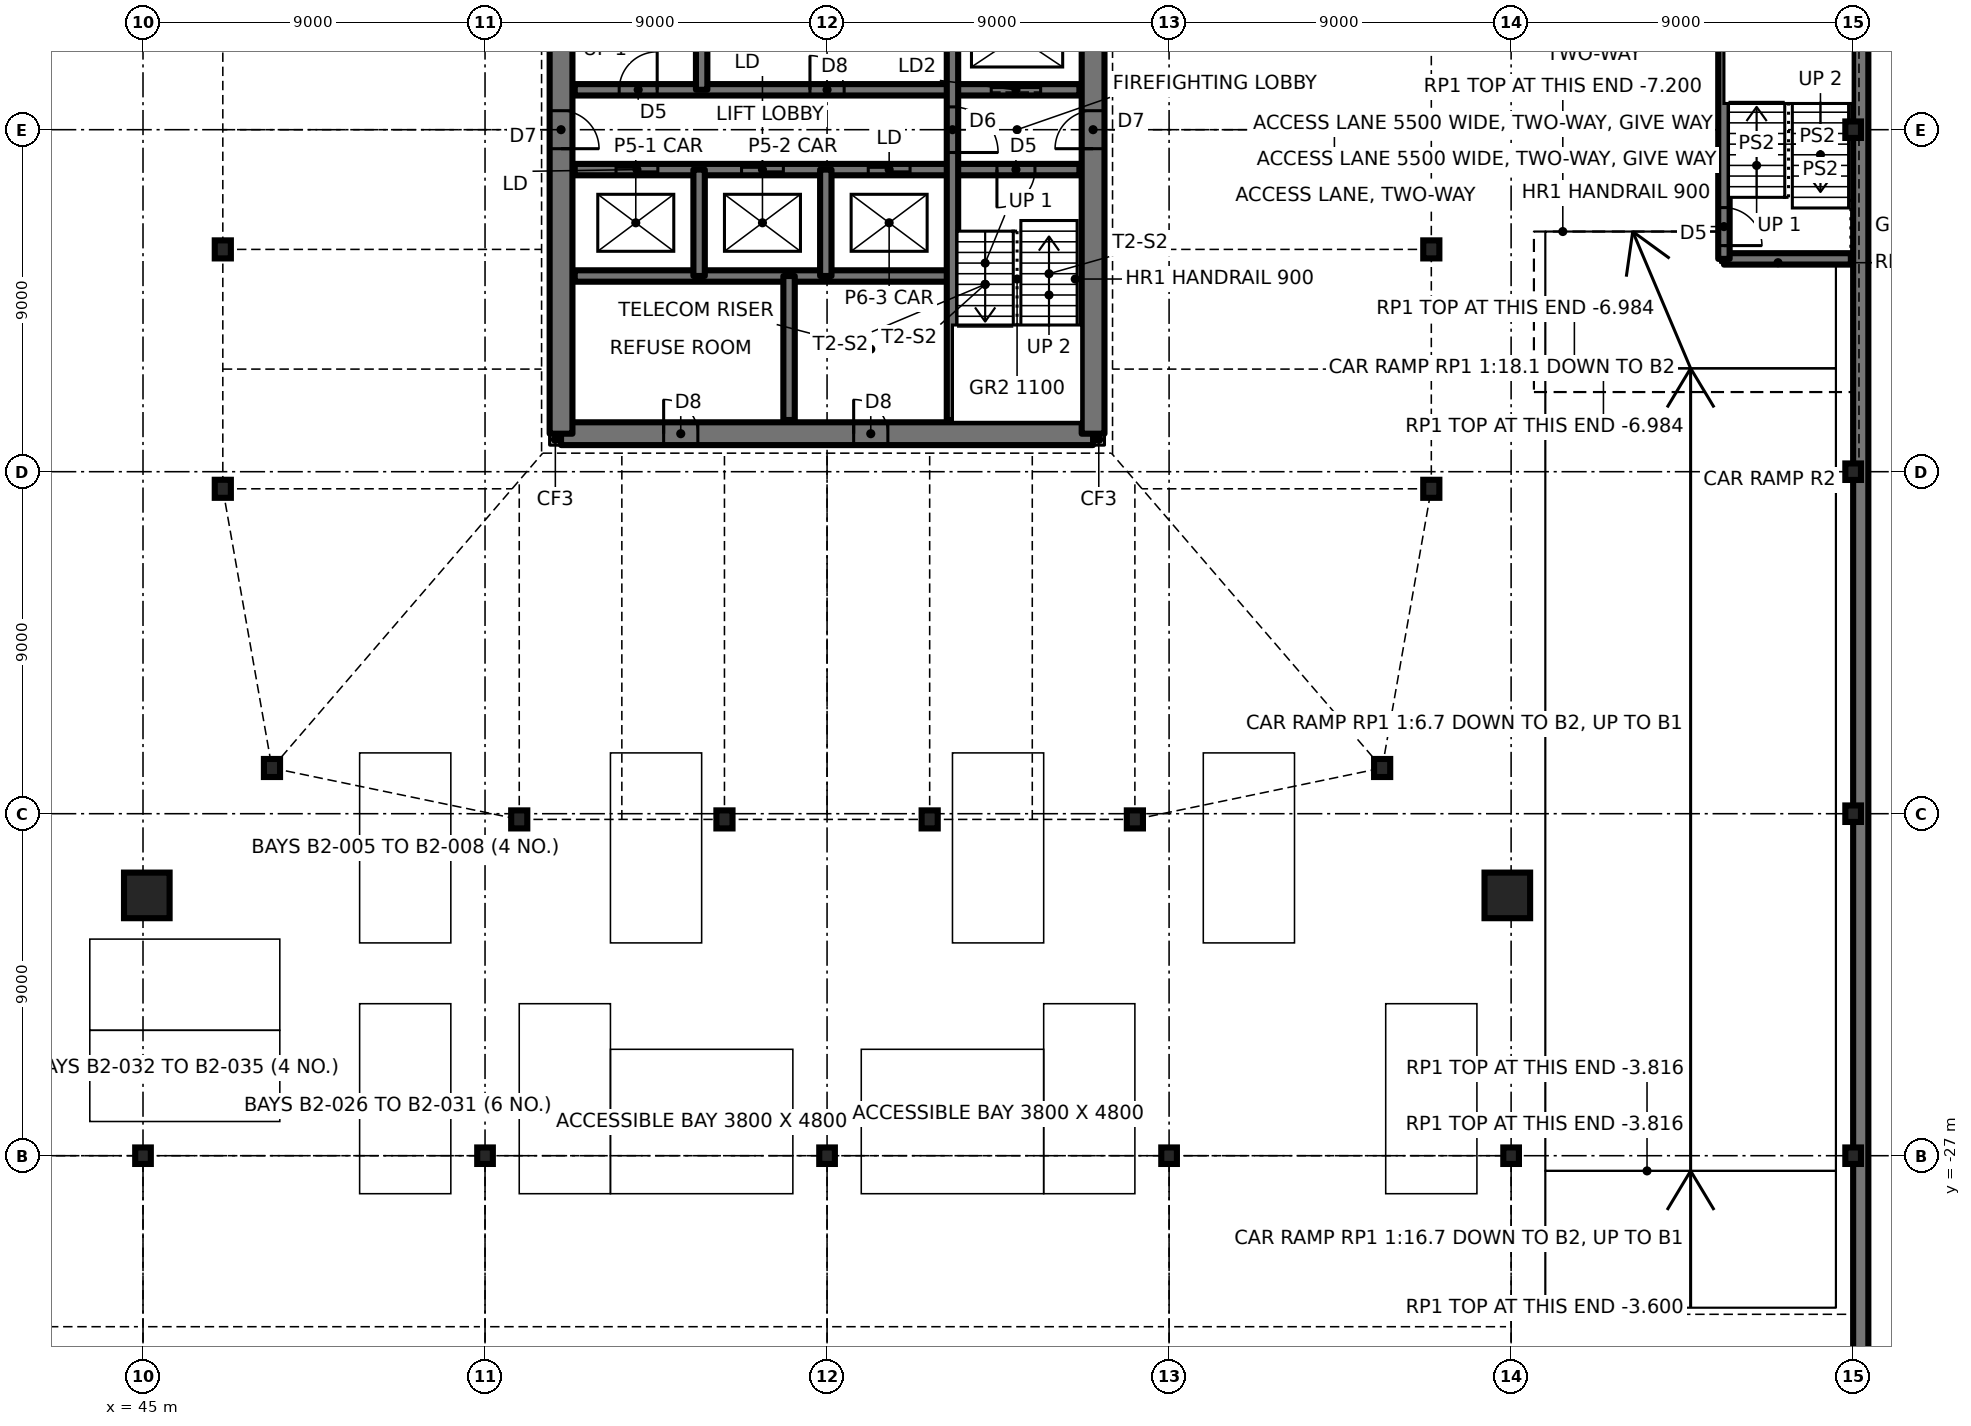
"""IFC4 building model, lengths in metres.
Left out: names, types, materials, properties, quantities, classifications, styles, units other than length and angle.
Written with IfcOpenShell. Run it as: python <this file> out.ifc"""

import sys

from ifc_helpers import new_model, si_unit, direction, frame, frame_2d, origin, origin_2d, place, context, subcontext, project, spatial, rectangle, hollow_rectangle, i_section, extrude, element, fill, save


model = new_model("IFC4")
c1 = context("Model", 3, precision=1e-05, world=origin(), true_north=direction((0.0, 1.0)))
c2 = subcontext(c1, "Body", "Model", "MODEL_VIEW")
j1 = project(units=[si_unit("LENGTHUNIT", "METRE"), si_unit("PLANEANGLEUNIT", "RADIAN")], contexts=[c1])
p1 = place(None, origin())
s1 = spatial("IfcSite", under=j1, at=p1, CompositionType="ELEMENT")
p2 = place(p1, origin())
s2 = spatial("IfcBuilding", under=s1, at=p2, CompositionType="ELEMENT")
p3 = place(p2, frame((0.0, 0.0, -7.2)))
s3 = spatial("IfcBuildingStorey", under=s2, at=p3, CompositionType="ELEMENT", Elevation=-7.2)
for number, where, z_axis, x_axis in (
    (1, (48.394, -16.797, -0.25), (0.0, 0.0, 1.0), (1.0, 0.0, 0.0)),
    (2, (54.9, -18.15, -0.25), (0.0, 0.0, 1.0), (1.0, 0.0, 0.0)),
    (3, (60.3, -18.15, -0.25), (0.0, 0.0, 1.0), (1.0, 0.0, 0.0)),
    (4, (65.7, -18.15, -0.25), (0.0, 0.0, 1.0), (1.0, 0.0, 0.0)),
    (5, (71.1, -18.15, -0.25), (0.0, 0.0, 1.0), (1.0, 0.0, 0.0)),
    (6, (77.606, -16.797, -0.25), (0.0, 0.0, 1.0), (1.0, 0.0, 0.0)),
    (7, (78.9, -9.45, -0.25), (0.0, 0.0, 1.0), (1.0, 0.0, 0.0)),
    (8, (78.9, -3.15, -0.25), (0.0, 0.0, 1.0), (1.0, 0.0, 0.0)),
    (9, (47.1, -3.15, -0.25), (0.0, 0.0, 1.0), (1.0, 0.0, 0.0)),
    (10, (47.1, -9.45, -0.25), (0.0, 0.0, 1.0), (1.0, 0.0, 0.0)),
):
    element("IfcColumn", number, at=place(p3, frame(where, z_axis=z_axis, x_axis=x_axis)), inside=s3, PredefinedType="COLUMN", context=c2, shape_type="SweptSolid", body=[
        extrude(i_section(OverallWidth=0.424, OverallDepth=0.475, WebThickness=0.048, FlangeThickness=0.077, at=origin_2d()), origin(), (0.0, 0.0, 1.0), 3.85),
    ])
for number, where, z_axis, x_axis in (
    (11, (45.1, -20.15, -0.25), (0.0, 0.0, 1.0), (1.0, 0.0, 0.0)),
    (12, (80.9, -20.15, -0.25), (0.0, 0.0, 1.0), (1.0, 0.0, 0.0)),
):
    element("IfcColumn", number, at=place(p3, frame(where, z_axis=z_axis, x_axis=x_axis)), inside=s3, PredefinedType="COLUMN", context=c2, shape_type="SweptSolid", body=[
        extrude(hollow_rectangle(XDim=1.2, YDim=1.2, WallThickness=0.07, at=origin_2d()), origin(), (0.0, 0.0, 1.0), 3.85),
    ])
for number, where, z_axis, x_axis in (
    (13, (45.0, -27.0, -0.25), (0.0, 0.0, 1.0), (1.0, 0.0, 0.0)),
    (14, (54.0, -27.0, -0.25), (0.0, 0.0, 1.0), (1.0, 0.0, 0.0)),
    (15, (63.0, -27.0, -0.25), (0.0, 0.0, 1.0), (1.0, 0.0, 0.0)),
    (16, (72.0, -27.0, -0.25), (0.0, 0.0, 1.0), (1.0, 0.0, 0.0)),
    (17, (81.0, -27.0, -0.25), (0.0, 0.0, 1.0), (1.0, 0.0, 0.0)),
    (18, (90.0, -27.0, -0.25), (0.0, 0.0, 1.0), (1.0, 0.0, 0.0)),
    (19, (90.0, -18.0, -0.25), (0.0, 0.0, 1.0), (1.0, 0.0, 0.0)),
    (20, (90.0, -9.0, -0.25), (0.0, 0.0, 1.0), (1.0, 0.0, 0.0)),
    (21, (90.0, 0.0, -0.25), (0.0, 0.0, 1.0), (1.0, 0.0, 0.0)),
):
    element("IfcColumn", number, at=place(p3, frame(where, z_axis=z_axis, x_axis=x_axis)), inside=s3, PredefinedType="COLUMN", context=c2, shape_type="SweptSolid", body=[
        extrude(i_section(OverallWidth=0.411, OverallDepth=0.434, WebThickness=0.036, FlangeThickness=0.057, at=origin_2d()), origin(), (0.0, 0.0, 1.0), 3.85),
    ])
for number, where, z_axis, x_axis in (
    (22, (55.7, -8.15, -0.25), (0.0, 0.0, 1.0), (1.0, 0.0, 0.0)),
    (23, (70.0, -8.15, -0.25), (0.0, 0.0, 1.0), (1.0, 0.0, 0.0)),
):
    element("IfcWall", number, at=place(p3, frame(where, z_axis=z_axis, x_axis=x_axis)), inside=s3, PredefinedType="SOLIDWALL", context=c2, shape_type="SweptSolid", body=[
        extrude(rectangle(XDim=0.3, YDim=0.3, at=frame_2d((0.15, 0.0))), origin(), (0.0, 0.0, 1.0), 3.85),
    ])
p4 = place(p3, frame((56.0, -8.0, -0.25), z_axis=(0.0, 0.0, 1.0), x_axis=(1.0, 0.0, 0.0)))
e24 = element("IfcWall", 24, at=p4, inside=s3, PredefinedType="SHEAR", context=c2, shape_type="SweptSolid", body=[
    extrude(rectangle(XDim=14.0, YDim=0.6, at=frame_2d((7.0, 0.0))), origin(), (0.0, 0.0, 1.0), 3.85),
])
p5 = place(p4, frame((2.7, 0.0, 0.25)))
e25 = element("IfcOpeningElement", 25, at=p5, cuts=e24, PredefinedType="OPENING", context=c2, shape_type="SweptSolid", body=[
    extrude(rectangle(XDim=0.9, YDim=2.1, at=frame_2d((0.45, 1.05))), frame((0.0, 0.31, 0.0), z_axis=(0.0, -1.0, 0.0), x_axis=(1.0, 0.0, 0.0)), (0.0, 0.0, 1.0), 0.62),
])
p6 = place(p4, frame((7.7, 0.0, 0.25)))
e26 = element("IfcOpeningElement", 26, at=p6, cuts=e24, PredefinedType="OPENING", context=c2, shape_type="SweptSolid", body=[
    extrude(rectangle(XDim=0.9, YDim=2.1, at=frame_2d((0.45, 1.05))), frame((0.0, 0.31, 0.0), z_axis=(0.0, -1.0, 0.0), x_axis=(1.0, 0.0, 0.0)), (0.0, 0.0, 1.0), 0.62),
])
p7 = place(p3, frame((70.0, -8.0, -0.25), z_axis=(0.0, 0.0, 1.0), x_axis=(0.0, 1.0, 0.0)))
e27 = element("IfcWall", 27, at=p7, inside=s3, PredefinedType="SHEAR", context=c2, shape_type="SweptSolid", body=[
    extrude(rectangle(XDim=16.0, YDim=0.6, at=frame_2d((8.0, 0.0))), origin(), (0.0, 0.0, 1.0), 3.85),
])
p8 = place(p7, frame((7.5, 0.0, 0.25)))
e28 = element("IfcOpeningElement", 28, at=p8, cuts=e27, PredefinedType="OPENING", context=c2, shape_type="SweptSolid", body=[
    extrude(rectangle(XDim=1.0, YDim=2.1, at=frame_2d((0.5, 1.05))), frame((0.0, 0.31, 0.0), z_axis=(0.0, -1.0, 0.0), x_axis=(1.0, 0.0, 0.0)), (0.0, 0.0, 1.0), 0.62),
])
p9 = place(p3, frame((56.0, 8.0, -0.25), z_axis=(0.0, 0.0, 1.0), x_axis=(0.0, -1.0, 0.0)))
e29 = element("IfcWall", 29, at=p9, inside=s3, PredefinedType="SHEAR", context=c2, shape_type="SweptSolid", body=[
    extrude(rectangle(XDim=16.0, YDim=0.6, at=frame_2d((8.0, 0.0))), origin(), (0.0, 0.0, 1.0), 3.85),
])
p10 = place(p9, frame((7.5, 0.0, 0.25)))
e30 = element("IfcOpeningElement", 30, at=p10, cuts=e29, PredefinedType="OPENING", context=c2, shape_type="SweptSolid", body=[
    extrude(rectangle(XDim=1.0, YDim=2.1, at=frame_2d((0.5, 1.05))), frame((0.0, 0.31, 0.0), z_axis=(0.0, -1.0, 0.0), x_axis=(1.0, 0.0, 0.0)), (0.0, 0.0, 1.0), 0.62),
])
p11 = place(p3, frame((90.2, -35.8, 0.0), z_axis=(0.0, 0.0, 1.0), x_axis=(0.0, 1.0, 0.0)))
e31 = element("IfcWall", 31, at=p11, inside=s3, PredefinedType="SOLIDWALL", context=c2, shape_type="SweptSolid", body=[
    extrude(rectangle(XDim=71.6, YDim=0.4, at=frame_2d((35.8, 0.0))), origin(), (0.0, 0.0, 1.0), 3.6),
])
p12 = place(p3, frame((56.36, -3.85, -0.25), z_axis=(0.0, 0.0, 1.0), x_axis=(1.0, 0.0, 0.0)))
e32 = element("IfcWall", 32, at=p12, inside=s3, PredefinedType="SOLIDWALL", context=c2, shape_type="SweptSolid", body=[
    extrude(rectangle(XDim=9.94, YDim=0.3, at=frame_2d((4.97, 0.0))), origin(), (0.0, 0.0, 1.0), 3.85),
])
p13 = place(p3, frame((86.6, -3.4, -0.25), z_axis=(0.0, 0.0, 1.0), x_axis=(1.0, 0.0, 0.0)))
e33 = element("IfcWall", 33, at=p13, inside=s3, PredefinedType="SOLIDWALL", context=c2, shape_type="SweptSolid", body=[
    extrude(rectangle(XDim=3.34, YDim=0.3, at=frame_2d((1.67, 0.0))), origin(), (0.0, 0.0, 1.0), 3.85),
])
p14 = place(p3, frame((56.36, -1.05, -0.25), z_axis=(0.0, 0.0, 1.0), x_axis=(1.0, 0.0, 0.0)))
e34 = element("IfcWall", 34, at=p14, inside=s3, PredefinedType="SOLIDWALL", context=c2, shape_type="SweptSolid", body=[
    extrude(rectangle(XDim=13.28, YDim=0.3, at=frame_2d((6.64, 0.0))), origin(), (0.0, 0.0, 1.0), 3.85),
])
p15 = place(p14, frame((11.11, 0.0, 0.25)))
e35 = element("IfcOpeningElement", 35, at=p15, cuts=e34, PredefinedType="OPENING", context=c2, shape_type="SweptSolid", body=[
    extrude(rectangle(XDim=1.0, YDim=2.1, at=frame_2d((0.5, 1.05))), frame((0.0, 0.16, 0.0), z_axis=(0.0, -1.0, 0.0), x_axis=(1.0, 0.0, 0.0)), (0.0, 0.0, 1.0), 0.32),
])
p16 = place(p14, frame((1.087, 0.0, 0.25)))
e36 = element("IfcOpeningElement", 36, at=p16, cuts=e34, PredefinedType="OPENING", context=c2, shape_type="SweptSolid", body=[
    extrude(rectangle(XDim=1.1, YDim=2.1, at=frame_2d((0.55, 1.05))), frame((0.0, 0.16, 0.0), z_axis=(0.0, -1.0, 0.0), x_axis=(1.0, 0.0, 0.0)), (0.0, 0.0, 1.0), 0.32),
])
p17 = place(p14, frame((4.39, 0.0, 0.25)))
e37 = element("IfcOpeningElement", 37, at=p17, cuts=e34, PredefinedType="OPENING", context=c2, shape_type="SweptSolid", body=[
    extrude(rectangle(XDim=1.1, YDim=2.1, at=frame_2d((0.55, 1.05))), frame((0.0, 0.16, 0.0), z_axis=(0.0, -1.0, 0.0), x_axis=(1.0, 0.0, 0.0)), (0.0, 0.0, 1.0), 0.32),
])
p18 = place(p14, frame((7.724, 0.0, 0.25)))
e38 = element("IfcOpeningElement", 38, at=p18, cuts=e34, PredefinedType="OPENING", context=c2, shape_type="SweptSolid", body=[
    extrude(rectangle(XDim=1.1, YDim=2.1, at=frame_2d((0.55, 1.05))), frame((0.0, 0.16, 0.0), z_axis=(0.0, -1.0, 0.0), x_axis=(1.0, 0.0, 0.0)), (0.0, 0.0, 1.0), 0.32),
])
p19 = place(p3, frame((56.36, 1.05, -0.25), z_axis=(0.0, 0.0, 1.0), x_axis=(1.0, 0.0, 0.0)))
e39 = element("IfcWall", 39, at=p19, inside=s3, PredefinedType="SOLIDWALL", context=c2, shape_type="SweptSolid", body=[
    extrude(rectangle(XDim=13.28, YDim=0.3, at=frame_2d((6.64, 0.0))), origin(), (0.0, 0.0, 1.0), 3.85),
])
p20 = place(p19, frame((1.17, 0.0, 0.25)))
e40 = element("IfcOpeningElement", 40, at=p20, cuts=e39, PredefinedType="OPENING", context=c2, shape_type="SweptSolid", body=[
    extrude(rectangle(XDim=1.0, YDim=2.1, at=frame_2d((0.5, 1.05))), frame((0.0, 0.16, 0.0), z_axis=(0.0, -1.0, 0.0), x_axis=(1.0, 0.0, 0.0)), (0.0, 0.0, 1.0), 0.32),
])
p21 = place(p19, frame((6.19, 0.0, 0.25)))
e41 = element("IfcOpeningElement", 41, at=p21, cuts=e39, PredefinedType="OPENING", context=c2, shape_type="SweptSolid", body=[
    extrude(rectangle(XDim=0.9, YDim=2.1, at=frame_2d((0.45, 1.05))), frame((0.0, 0.16, 0.0), z_axis=(0.0, -1.0, 0.0), x_axis=(1.0, 0.0, 0.0)), (0.0, 0.0, 1.0), 0.32),
])
p22 = place(p19, frame((10.96, 0.0, 0.25)))
e42 = element("IfcOpeningElement", 42, at=p22, cuts=e39, PredefinedType="OPENING", context=c2, shape_type="SweptSolid", body=[
    extrude(rectangle(XDim=1.3, YDim=2.1, at=frame_2d((0.65, 1.05))), frame((0.0, 0.16, 0.0), z_axis=(0.0, -1.0, 0.0), x_axis=(1.0, 0.0, 0.0)), (0.0, 0.0, 1.0), 0.32),
])
p23 = place(p3, frame((86.6, -3.4, -0.25), z_axis=(0.0, 0.0, 1.0), x_axis=(0.0, 1.0, 0.0)))
e43 = element("IfcWall", 43, at=p23, inside=s3, PredefinedType="SOLIDWALL", context=c2, shape_type="SweptSolid", body=[
    extrude(rectangle(XDim=7.4, YDim=0.3, at=frame_2d((3.7, 0.0))), origin(), (0.0, 0.0, 1.0), 3.85),
])
p24 = place(p23, frame((0.35, 0.0, 0.25)))
e44 = element("IfcOpeningElement", 44, at=p24, cuts=e43, PredefinedType="OPENING", context=c2, shape_type="SweptSolid", body=[
    extrude(rectangle(XDim=1.0, YDim=2.1, at=frame_2d((0.5, 1.05))), frame((0.0, 0.16, 0.0), z_axis=(0.0, -1.0, 0.0), x_axis=(1.0, 0.0, 0.0)), (0.0, 0.0, 1.0), 0.32),
])
p25 = place(p3, frame((66.3, -7.64, -0.25), z_axis=(0.0, 0.0, 1.0), x_axis=(0.0, 1.0, 0.0)))
e45 = element("IfcWall", 45, at=p25, inside=s3, PredefinedType="SOLIDWALL", context=c2, shape_type="SweptSolid", body=[
    extrude(rectangle(XDim=11.49, YDim=0.3, at=frame_2d((5.745, 0.0))), origin(), (0.0, 0.0, 1.0), 3.85),
])
p26 = place(p25, frame((7.04, 0.0, 0.25)))
e46 = element("IfcOpeningElement", 46, at=p26, cuts=e45, PredefinedType="OPENING", context=c2, shape_type="SweptSolid", body=[
    extrude(rectangle(XDim=1.2, YDim=2.1, at=frame_2d((0.6, 1.05))), frame((0.0, 0.16, 0.0), z_axis=(0.0, -1.0, 0.0), x_axis=(1.0, 0.0, 0.0)), (0.0, 0.0, 1.0), 0.32),
])
p27 = place(p3, frame((62.967, -3.85, -0.25), z_axis=(0.0, 0.0, 1.0), x_axis=(0.0, 1.0, 0.0)))
e47 = element("IfcWall", 47, at=p27, inside=s3, PredefinedType="SOLIDWALL", context=c2, shape_type="SweptSolid", body=[
    extrude(rectangle(XDim=2.8, YDim=0.3, at=frame_2d((1.4, 0.0))), origin(), (0.0, 0.0, 1.0), 3.85),
])
p28 = place(p3, frame((62.0, -7.64, -0.25), z_axis=(0.0, 0.0, 1.0), x_axis=(0.0, 1.0, 0.0)))
e48 = element("IfcWall", 48, at=p28, inside=s3, PredefinedType="SOLIDWALL", context=c2, shape_type="SweptSolid", body=[
    extrude(rectangle(XDim=3.79, YDim=0.3, at=frame_2d((1.895, 0.0))), origin(), (0.0, 0.0, 1.0), 3.85),
])
p29 = place(p3, frame((59.7, 1.05, -0.25), z_axis=(0.0, 0.0, 1.0), x_axis=(0.0, 1.0, 0.0)))
e49 = element("IfcWall", 49, at=p29, inside=s3, PredefinedType="SOLIDWALL", context=c2, shape_type="SweptSolid", body=[
    extrude(rectangle(XDim=6.59, YDim=0.3, at=frame_2d((3.295, 0.0))), origin(), (0.0, 0.0, 1.0), 3.85),
])
p30 = place(p3, frame((59.633, -3.85, -0.25), z_axis=(0.0, 0.0, 1.0), x_axis=(0.0, 1.0, 0.0)))
e50 = element("IfcWall", 50, at=p30, inside=s3, PredefinedType="SOLIDWALL", context=c2, shape_type="SweptSolid", body=[
    extrude(rectangle(XDim=2.8, YDim=0.3, at=frame_2d((1.4, 0.0))), origin(), (0.0, 0.0, 1.0), 3.85),
])
p31 = place(p20, origin())
e51 = element("IfcDoor", 51, at=p31, inside=s3, OperationType="SINGLE_SWING_RIGHT", PredefinedType="DOOR", context=c2, shape_type="SweptSolid", body=[
    extrude(rectangle(XDim=1.0, YDim=2.1, at=frame_2d((0.5, 1.05))), frame((0.0, 0.025, 0.0), z_axis=(0.0, -1.0, 0.0), x_axis=(1.0, 0.0, 0.0)), (0.0, 0.0, 1.0), 0.05),
])
fill(e40, e51)
p32 = place(p15, frame((1.0, 0.0, 0.0), z_axis=(0.0, 0.0, 1.0), x_axis=(-1.0, 0.0, 0.0)))
e52 = element("IfcDoor", 52, at=p32, inside=s3, OperationType="SINGLE_SWING_RIGHT", PredefinedType="DOOR", context=c2, shape_type="SweptSolid", body=[
    extrude(rectangle(XDim=1.0, YDim=2.1, at=frame_2d((0.5, 1.05))), frame((0.0, 0.025, 0.0), z_axis=(0.0, -1.0, 0.0), x_axis=(1.0, 0.0, 0.0)), (0.0, 0.0, 1.0), 0.05),
])
fill(e35, e52)
p33 = place(p26, frame((1.2, 0.0, 0.0), z_axis=(0.0, 0.0, 1.0), x_axis=(-1.0, 0.0, 0.0)))
e53 = element("IfcDoor", 53, at=p33, inside=s3, OperationType="SINGLE_SWING_RIGHT", PredefinedType="DOOR", context=c2, shape_type="SweptSolid", body=[
    extrude(rectangle(XDim=1.2, YDim=2.1, at=frame_2d((0.6, 1.05))), frame((0.0, 0.025, 0.0), z_axis=(0.0, -1.0, 0.0), x_axis=(1.0, 0.0, 0.0)), (0.0, 0.0, 1.0), 0.05),
])
fill(e46, e53)
p34 = place(p21, origin())
e54 = element("IfcDoor", 54, at=p34, inside=s3, OperationType="SINGLE_SWING_LEFT", PredefinedType="DOOR", context=c2, shape_type="SweptSolid", body=[
    extrude(rectangle(XDim=0.9, YDim=2.1, at=frame_2d((0.45, 1.05))), frame((0.0, 0.025, 0.0), z_axis=(0.0, -1.0, 0.0), x_axis=(1.0, 0.0, 0.0)), (0.0, 0.0, 1.0), 0.05),
])
fill(e41, e54)
p35 = place(p24, frame((1.0, 0.0, 0.0), z_axis=(0.0, 0.0, 1.0), x_axis=(-1.0, 0.0, 0.0)))
e55 = element("IfcDoor", 55, at=p35, inside=s3, OperationType="SINGLE_SWING_RIGHT", PredefinedType="DOOR", context=c2, shape_type="SweptSolid", body=[
    extrude(rectangle(XDim=1.0, YDim=2.1, at=frame_2d((0.5, 1.05))), frame((0.0, 0.025, 0.0), z_axis=(0.0, -1.0, 0.0), x_axis=(1.0, 0.0, 0.0)), (0.0, 0.0, 1.0), 0.05),
])
fill(e44, e55)
p36 = place(p10, origin())
e56 = element("IfcDoor", 56, at=p36, inside=s3, OperationType="SINGLE_SWING_RIGHT", PredefinedType="DOOR", context=c2, shape_type="SweptSolid", body=[
    extrude(rectangle(XDim=1.0, YDim=2.1, at=frame_2d((0.5, 1.05))), frame((0.0, 0.025, 0.0), z_axis=(0.0, -1.0, 0.0), x_axis=(1.0, 0.0, 0.0)), (0.0, 0.0, 1.0), 0.05),
])
fill(e30, e56)
p37 = place(p8, origin())
e57 = element("IfcDoor", 57, at=p37, inside=s3, OperationType="SINGLE_SWING_LEFT", PredefinedType="DOOR", context=c2, shape_type="SweptSolid", body=[
    extrude(rectangle(XDim=1.0, YDim=2.1, at=frame_2d((0.5, 1.05))), frame((0.0, 0.025, 0.0), z_axis=(0.0, -1.0, 0.0), x_axis=(1.0, 0.0, 0.0)), (0.0, 0.0, 1.0), 0.05),
])
fill(e28, e57)
p38 = place(p5, origin())
e58 = element("IfcDoor", 58, at=p38, inside=s3, OperationType="SINGLE_SWING_LEFT", PredefinedType="DOOR", context=c2, shape_type="SweptSolid", body=[
    extrude(rectangle(XDim=0.9, YDim=2.1, at=frame_2d((0.45, 1.05))), frame((0.0, 0.025, 0.0), z_axis=(0.0, -1.0, 0.0), x_axis=(1.0, 0.0, 0.0)), (0.0, 0.0, 1.0), 0.05),
])
fill(e25, e58)
p39 = place(p6, origin())
e59 = element("IfcDoor", 59, at=p39, inside=s3, OperationType="SINGLE_SWING_LEFT", PredefinedType="DOOR", context=c2, shape_type="SweptSolid", body=[
    extrude(rectangle(XDim=0.9, YDim=2.1, at=frame_2d((0.45, 1.05))), frame((0.0, 0.025, 0.0), z_axis=(0.0, -1.0, 0.0), x_axis=(1.0, 0.0, 0.0)), (0.0, 0.0, 1.0), 0.05),
])
fill(e26, e59)
p40 = place(p16, origin())
e60 = element("IfcDoor", 60, at=p40, inside=s3, OperationType="DOUBLE_DOOR_SLIDING", PredefinedType="DOOR", context=c2, shape_type="SweptSolid", body=[
    extrude(rectangle(XDim=1.1, YDim=2.1, at=frame_2d((0.55, 1.05))), frame((0.0, 0.025, 0.0), z_axis=(0.0, -1.0, 0.0), x_axis=(1.0, 0.0, 0.0)), (0.0, 0.0, 1.0), 0.05),
])
fill(e36, e60)
p41 = place(p17, origin())
e61 = element("IfcDoor", 61, at=p41, inside=s3, OperationType="DOUBLE_DOOR_SLIDING", PredefinedType="DOOR", context=c2, shape_type="SweptSolid", body=[
    extrude(rectangle(XDim=1.1, YDim=2.1, at=frame_2d((0.55, 1.05))), frame((0.0, 0.025, 0.0), z_axis=(0.0, -1.0, 0.0), x_axis=(1.0, 0.0, 0.0)), (0.0, 0.0, 1.0), 0.05),
])
fill(e37, e61)
p42 = place(p18, origin())
e62 = element("IfcDoor", 62, at=p42, inside=s3, OperationType="DOUBLE_DOOR_SLIDING", PredefinedType="DOOR", context=c2, shape_type="SweptSolid", body=[
    extrude(rectangle(XDim=1.1, YDim=2.1, at=frame_2d((0.55, 1.05))), frame((0.0, 0.025, 0.0), z_axis=(0.0, -1.0, 0.0), x_axis=(1.0, 0.0, 0.0)), (0.0, 0.0, 1.0), 0.05),
])
fill(e38, e62)
p43 = place(p22, origin())
e63 = element("IfcDoor", 63, at=p43, inside=s3, OperationType="SLIDING_TO_LEFT", PredefinedType="DOOR", context=c2, shape_type="SweptSolid", body=[
    extrude(rectangle(XDim=1.3, YDim=2.1, at=frame_2d((0.65, 1.05))), frame((0.0, 0.025, 0.0), z_axis=(0.0, -1.0, 0.0), x_axis=(1.0, 0.0, 0.0)), (0.0, 0.0, 1.0), 0.05),
])
fill(e42, e63)
save(model, sys.argv[1])
